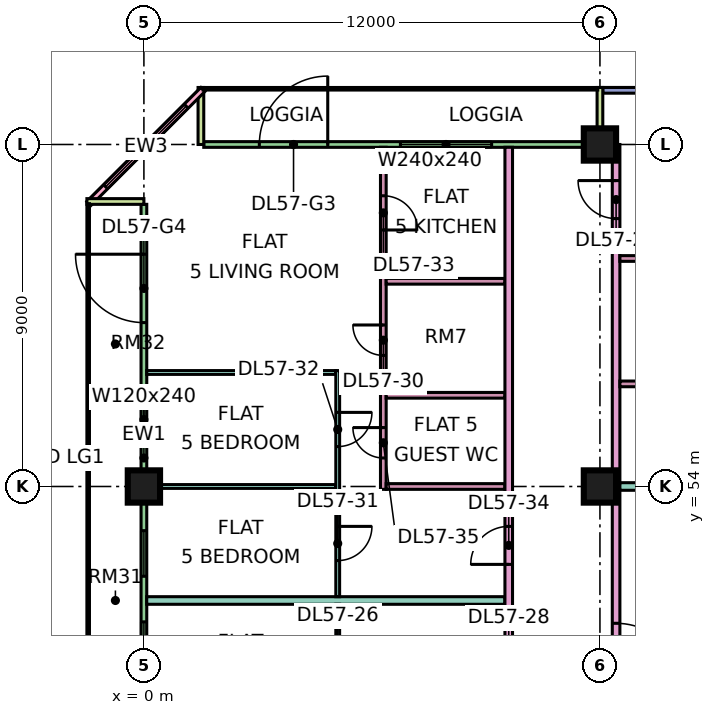
"""IFC4 building model, lengths in metres.
Left out: names, types, materials, properties, quantities, classifications, styles, units other than length and angle.
Written with IfcOpenShell. Run it as: python <this file> out.ifc"""

import sys

from ifc_helpers import new_model, si_unit, direction, frame, frame_2d, origin, origin_2d, place, context, subcontext, project, spatial, rectangle, extrude, element, fill, save


model = new_model("IFC4")
c1 = context("Model", 3, precision=1e-05, world=origin(), true_north=direction((0.0, 1.0)))
c2 = subcontext(c1, "Body", "Model", "MODEL_VIEW")
j1 = project(units=[si_unit("LENGTHUNIT", "METRE"), si_unit("PLANEANGLEUNIT", "RADIAN")], contexts=[c1])
p1 = place(None, origin())
s1 = spatial("IfcSite", under=j1, at=p1, CompositionType="ELEMENT")
p2 = place(p1, origin())
s2 = spatial("IfcBuilding", under=s1, at=p2, CompositionType="ELEMENT")
p3 = place(p2, frame((0.0, 0.0, 241.65)))
s3 = spatial("IfcBuildingStorey", under=s2, at=p3, CompositionType="ELEMENT", Elevation=241.65)
for number, where, z_axis, x_axis in (
    (1, (0.0, 54.0, 0.0), (0.0, 0.0, 1.0), (1.0, 0.0, 0.0)),
    (2, (12.0, 54.0, 0.0), (0.0, 0.0, 1.0), (1.0, 0.0, 0.0)),
    (3, (12.0, 63.0, 0.0), (0.0, 0.0, 1.0), (1.0, 0.0, 0.0)),
):
    element("IfcColumn", number, at=place(p3, frame(where, z_axis=z_axis, x_axis=x_axis)), inside=s3, PredefinedType="COLUMN", context=c2, shape_type="SweptSolid", body=[
        extrude(rectangle(XDim=0.85, YDim=0.85, at=origin_2d()), origin(), (0.0, 0.0, 1.0), 3.75),
    ])
p4 = place(p3, frame((22.5, 64.425, 0.0), z_axis=(0.0, 0.0, 1.0), x_axis=(-1.0, 0.0, 0.0)))
e4 = element("IfcWall", 4, at=p4, inside=s3, PredefinedType="SOLIDWALL", context=c2, shape_type="SweptSolid", body=[
    extrude(rectangle(XDim=10.425, YDim=0.15, at=frame_2d((5.212, 0.0))), origin(), (0.0, 0.0, 1.0), 3.35),
])
p5 = place(p4, frame((0.538, 0.0, 0.45)))
e5 = element("IfcOpeningElement", 5, at=p5, cuts=e4, PredefinedType="OPENING", context=c2, shape_type="SweptSolid", body=[
    extrude(rectangle(XDim=2.4, YDim=2.4, at=frame_2d((1.2, 1.2))), frame((0.0, 0.085, 0.0), z_axis=(0.0, -1.0, 0.0), x_axis=(1.0, 0.0, 0.0)), (0.0, 0.0, 1.0), 0.17),
])
p6 = place(p4, frame((5.275, 0.0, 0.45)))
e6 = element("IfcOpeningElement", 6, at=p6, cuts=e4, PredefinedType="OPENING", context=c2, shape_type="SweptSolid", body=[
    extrude(rectangle(XDim=3.0, YDim=2.4, at=frame_2d((1.5, 1.2))), frame((0.0, 0.085, 0.0), z_axis=(0.0, -1.0, 0.0), x_axis=(1.0, 0.0, 0.0)), (0.0, 0.0, 1.0), 0.17),
])
p7 = place(p3, frame((11.925, 63.0, 0.0), z_axis=(0.0, 0.0, 1.0), x_axis=(-1.0, 0.0, 0.0)))
e7 = element("IfcWall", 7, at=p7, inside=s3, PredefinedType="SOLIDWALL", context=c2, shape_type="SweptSolid", body=[
    extrude(rectangle(XDim=10.35, YDim=0.15, at=frame_2d((5.175, 0.0))), origin(), (0.0, 0.0, 1.0), 3.35),
])
p8 = place(p7, frame((2.775, 0.0, 0.45)))
e8 = element("IfcOpeningElement", 8, at=p8, cuts=e7, PredefinedType="OPENING", context=c2, shape_type="SweptSolid", body=[
    extrude(rectangle(XDim=2.4, YDim=2.4, at=frame_2d((1.2, 1.2))), frame((0.0, 0.085, 0.0), z_axis=(0.0, -1.0, 0.0), x_axis=(1.0, 0.0, 0.0)), (0.0, 0.0, 1.0), 0.17),
])
p9 = place(p7, frame((7.087, 0.0, 0.0)))
e9 = element("IfcOpeningElement", 9, at=p9, cuts=e7, PredefinedType="OPENING", context=c2, shape_type="SweptSolid", body=[
    extrude(rectangle(XDim=1.8, YDim=2.4, at=frame_2d((0.9, 1.2))), frame((0.0, 0.085, 0.0), z_axis=(0.0, -1.0, 0.0), x_axis=(1.0, 0.0, 0.0)), (0.0, 0.0, 1.0), 0.17),
])
for number, where, z_axis, x_axis in (
    (10, (12.0, 64.5, 0.0), (0.0, 0.0, 1.0), (0.0, -1.0, 0.0)),
    (11, (1.5, 64.5, 0.0), (0.0, 0.0, 1.0), (0.0, -1.0, 0.0)),
):
    element("IfcWall", number, at=place(p3, frame(where, z_axis=z_axis, x_axis=x_axis)), inside=s3, PredefinedType="SOLIDWALL", context=c2, shape_type="SweptSolid", body=[
        extrude(rectangle(XDim=1.5, YDim=0.15, at=frame_2d((0.75, 0.0))), origin(), (0.0, 0.0, 1.0), 3.35),
    ])
p10 = place(p3, frame((1.553, 64.447, 0.0), z_axis=(0.0, 0.0, 1.0), x_axis=(-0.707106781187, -0.707106781187, 0.0)))
e12 = element("IfcWall", 12, at=p10, inside=s3, PredefinedType="SOLIDWALL", context=c2, shape_type="SweptSolid", body=[
    extrude(rectangle(XDim=4.243, YDim=0.15, at=frame_2d((2.121, 0.0))), origin(), (0.0, 0.0, 1.0), 3.35),
])
p11 = place(p10, frame((0.621, 0.0, 0.45)))
e13 = element("IfcOpeningElement", 13, at=p11, cuts=e12, PredefinedType="OPENING", context=c2, shape_type="SweptSolid", body=[
    extrude(rectangle(XDim=3.0, YDim=2.4, at=frame_2d((1.5, 1.2))), frame((0.0, 0.085, 0.0), z_axis=(0.0, -1.0, 0.0), x_axis=(1.0, 0.0, 0.0)), (0.0, 0.0, 1.0), 0.17),
])
p12 = place(p3, frame((0.0, 61.425, 0.0), z_axis=(0.0, 0.0, 1.0), x_axis=(0.0, -1.0, 0.0)))
e14 = element("IfcWall", 14, at=p12, inside=s3, PredefinedType="SOLIDWALL", context=c2, shape_type="SweptSolid", body=[
    extrude(rectangle(XDim=13.35, YDim=0.15, at=frame_2d((6.675, 0.0))), origin(), (0.0, 0.0, 1.0), 3.35),
])
p13 = place(p12, frame((1.312, 0.0, 0.0)))
e15 = element("IfcOpeningElement", 15, at=p13, cuts=e14, PredefinedType="OPENING", context=c2, shape_type="SweptSolid", body=[
    extrude(rectangle(XDim=1.8, YDim=2.4, at=frame_2d((0.9, 1.2))), frame((0.0, 0.085, 0.0), z_axis=(0.0, -1.0, 0.0), x_axis=(1.0, 0.0, 0.0)), (0.0, 0.0, 1.0), 0.17),
])
p14 = place(p12, frame((5.062, 0.0, 0.45)))
e16 = element("IfcOpeningElement", 16, at=p14, cuts=e14, PredefinedType="OPENING", context=c2, shape_type="SweptSolid", body=[
    extrude(rectangle(XDim=1.2, YDim=2.4, at=frame_2d((0.6, 1.2))), frame((0.0, 0.085, 0.0), z_axis=(0.0, -1.0, 0.0), x_axis=(1.0, 0.0, 0.0)), (0.0, 0.0, 1.0), 0.17),
])
p15 = place(p12, frame((8.587, 0.0, 0.45)))
e17 = element("IfcOpeningElement", 17, at=p15, cuts=e14, PredefinedType="OPENING", context=c2, shape_type="SweptSolid", body=[
    extrude(rectangle(XDim=1.2, YDim=2.4, at=frame_2d((0.6, 1.2))), frame((0.0, 0.085, 0.0), z_axis=(0.0, -1.0, 0.0), x_axis=(1.0, 0.0, 0.0)), (0.0, 0.0, 1.0), 0.17),
])
p16 = place(p12, frame((10.988, 0.0, 0.45)))
e18 = element("IfcOpeningElement", 18, at=p16, cuts=e14, PredefinedType="OPENING", context=c2, shape_type="SweptSolid", body=[
    extrude(rectangle(XDim=1.8, YDim=2.4, at=frame_2d((0.9, 1.2))), frame((0.0, 0.085, 0.0), z_axis=(0.0, -1.0, 0.0), x_axis=(1.0, 0.0, 0.0)), (0.0, 0.0, 1.0), 0.17),
])
p17 = place(p3, frame((-1.5, 61.5, 0.0), z_axis=(0.0, 0.0, 1.0), x_axis=(1.0, 0.0, 0.0)))
e19 = element("IfcWall", 19, at=p17, inside=s3, PredefinedType="SOLIDWALL", context=c2, shape_type="SweptSolid", body=[
    extrude(rectangle(XDim=1.5, YDim=0.15, at=frame_2d((0.75, 0.0))), origin(), (0.0, 0.0, 1.0), 3.35),
])
p18 = place(p3, frame((0.074, 51.0, 0.0), z_axis=(0.0, 0.0, 1.0), x_axis=(1.0, 0.0, 0.0)))
e20 = element("IfcWall", 20, at=p18, inside=s3, PredefinedType="PARTITIONING", context=c2, shape_type="SweptSolid", body=[
    extrude(rectangle(XDim=9.426, YDim=0.2, at=frame_2d((4.713, 0.0))), origin(), (0.0, 0.0, 1.0), 3.35),
])
for number, where, z_axis, x_axis in (
    (21, (0.074, 54.0, 0.0), (0.0, 0.0, 1.0), (1.0, 0.0, 0.0)),
    (22, (0.074, 57.0, 0.0), (0.0, 0.0, 1.0), (1.0, 0.0, 0.0)),
):
    element("IfcWall", number, at=place(p3, frame(where, z_axis=z_axis, x_axis=x_axis)), inside=s3, PredefinedType="PARTITIONING", context=c2, shape_type="SweptSolid", body=[
        extrude(rectangle(XDim=4.976, YDim=0.1, at=frame_2d((2.488, 0.0))), origin(), (0.0, 0.0, 1.0), 3.35),
    ])
p19 = place(p3, frame((5.1, 44.95, 0.0), z_axis=(0.0, 0.0, 1.0), x_axis=(0.0, 1.0, 0.0)))
e23 = element("IfcWall", 23, at=p19, inside=s3, PredefinedType="PARTITIONING", context=c2, shape_type="SweptSolid", body=[
    extrude(rectangle(XDim=5.95, YDim=0.1, at=frame_2d((2.975, 0.0))), origin(), (0.0, 0.0, 1.0), 3.35),
])
p20 = place(p19, frame((1.1, 0.0, 0.0)))
e24 = element("IfcOpeningElement", 24, at=p20, cuts=e23, PredefinedType="OPENING", context=c2, shape_type="SweptSolid", body=[
    extrude(rectangle(XDim=0.9, YDim=2.1, at=frame_2d((0.45, 1.05))), frame((0.0, 0.06, 0.0), z_axis=(0.0, -1.0, 0.0), x_axis=(1.0, 0.0, 0.0)), (0.0, 0.0, 1.0), 0.12),
])
p21 = place(p19, frame((4.1, 0.0, 0.0)))
e25 = element("IfcOpeningElement", 25, at=p21, cuts=e23, PredefinedType="OPENING", context=c2, shape_type="SweptSolid", body=[
    extrude(rectangle(XDim=0.9, YDim=2.1, at=frame_2d((0.45, 1.05))), frame((0.0, 0.06, 0.0), z_axis=(0.0, -1.0, 0.0), x_axis=(1.0, 0.0, 0.0)), (0.0, 0.0, 1.0), 0.12),
])
p22 = place(p3, frame((5.1, 51.1, 0.0), z_axis=(0.0, 0.0, 1.0), x_axis=(0.0, 1.0, 0.0)))
e26 = element("IfcWall", 26, at=p22, inside=s3, PredefinedType="PARTITIONING", context=c2, shape_type="SweptSolid", body=[
    extrude(rectangle(XDim=5.95, YDim=0.1, at=frame_2d((2.975, 0.0))), origin(), (0.0, 0.0, 1.0), 3.35),
])
p23 = place(p22, frame((0.95, 0.0, 0.0)))
e27 = element("IfcOpeningElement", 27, at=p23, cuts=e26, PredefinedType="OPENING", context=c2, shape_type="SweptSolid", body=[
    extrude(rectangle(XDim=0.9, YDim=2.1, at=frame_2d((0.45, 1.05))), frame((0.0, 0.06, 0.0), z_axis=(0.0, -1.0, 0.0), x_axis=(1.0, 0.0, 0.0)), (0.0, 0.0, 1.0), 0.12),
])
p24 = place(p22, frame((3.95, 0.0, 0.0)))
e28 = element("IfcOpeningElement", 28, at=p24, cuts=e26, PredefinedType="OPENING", context=c2, shape_type="SweptSolid", body=[
    extrude(rectangle(XDim=0.9, YDim=2.1, at=frame_2d((0.45, 1.05))), frame((0.0, 0.06, 0.0), z_axis=(0.0, -1.0, 0.0), x_axis=(1.0, 0.0, 0.0)), (0.0, 0.0, 1.0), 0.12),
])
p25 = place(p3, frame((6.3, 53.925, 0.0), z_axis=(0.0, 0.0, 1.0), x_axis=(0.0, 1.0, 0.0)))
e29 = element("IfcWall", 29, at=p25, inside=s3, PredefinedType="PARTITIONING", context=c2, shape_type="SweptSolid", body=[
    extrude(rectangle(XDim=9.001, YDim=0.15, at=frame_2d((4.5, 0.0))), origin(), (0.0, 0.0, 1.0), 3.35),
])
p26 = place(p25, frame((3.525, 0.0, 0.0)))
e30 = element("IfcOpeningElement", 30, at=p26, cuts=e29, PredefinedType="OPENING", context=c2, shape_type="SweptSolid", body=[
    extrude(rectangle(XDim=0.8, YDim=2.1, at=frame_2d((0.4, 1.05))), frame((0.0, 0.085, 0.0), z_axis=(0.0, -1.0, 0.0), x_axis=(1.0, 0.0, 0.0)), (0.0, 0.0, 1.0), 0.17),
])
p27 = place(p25, frame((6.825, 0.0, 0.0)))
e31 = element("IfcOpeningElement", 31, at=p27, cuts=e29, PredefinedType="OPENING", context=c2, shape_type="SweptSolid", body=[
    extrude(rectangle(XDim=0.9, YDim=2.1, at=frame_2d((0.45, 1.05))), frame((0.0, 0.085, 0.0), z_axis=(0.0, -1.0, 0.0), x_axis=(1.0, 0.0, 0.0)), (0.0, 0.0, 1.0), 0.17),
])
p28 = place(p25, frame((0.825, 0.0, 0.0)))
e32 = element("IfcOpeningElement", 32, at=p28, cuts=e29, PredefinedType="OPENING", context=c2, shape_type="SweptSolid", body=[
    extrude(rectangle(XDim=0.8, YDim=2.1, at=frame_2d((0.4, 1.05))), frame((0.0, 0.085, 0.0), z_axis=(0.0, -1.0, 0.0), x_axis=(1.0, 0.0, 0.0)), (0.0, 0.0, 1.0), 0.17),
])
for number, where, z_axis, x_axis in (
    (33, (6.375, 54.0, 0.0), (0.0, 0.0, 1.0), (1.0, 0.0, 0.0)),
    (34, (6.375, 56.4, 0.0), (0.0, 0.0, 1.0), (1.0, 0.0, 0.0)),
    (35, (6.375, 59.4, 0.0), (0.0, 0.0, 1.0), (1.0, 0.0, 0.0)),
):
    element("IfcWall", number, at=place(p3, frame(where, z_axis=z_axis, x_axis=x_axis)), inside=s3, PredefinedType="PARTITIONING", context=c2, shape_type="SweptSolid", body=[
        extrude(rectangle(XDim=3.125, YDim=0.15, at=frame_2d((1.562, 0.0))), origin(), (0.0, 0.0, 1.0), 3.35),
    ])
p29 = place(p3, frame((9.6, 20.0, 0.0), z_axis=(0.0, 0.0, 1.0), x_axis=(0.0, 1.0, 0.0)))
e36 = element("IfcWall", 36, at=p29, inside=s3, PredefinedType="PARTITIONING", context=c2, shape_type="SweptSolid", body=[
    extrude(rectangle(XDim=42.926, YDim=0.2, at=frame_2d((21.463, 0.0))), origin(), (0.0, 0.0, 1.0), 3.35),
])
p30 = place(p29, frame((28.95, 0.0, 0.0)))
e37 = element("IfcOpeningElement", 37, at=p30, cuts=e36, PredefinedType="OPENING", context=c2, shape_type="SweptSolid", body=[
    extrude(rectangle(XDim=1.0, YDim=2.1, at=frame_2d((0.5, 1.05))), frame((0.0, 0.11, 0.0), z_axis=(0.0, -1.0, 0.0), x_axis=(1.0, 0.0, 0.0)), (0.0, 0.0, 1.0), 0.22),
])
p31 = place(p29, frame((31.95, 0.0, 0.0)))
e38 = element("IfcOpeningElement", 38, at=p31, cuts=e36, PredefinedType="OPENING", context=c2, shape_type="SweptSolid", body=[
    extrude(rectangle(XDim=1.0, YDim=2.1, at=frame_2d((0.5, 1.05))), frame((0.0, 0.11, 0.0), z_axis=(0.0, -1.0, 0.0), x_axis=(1.0, 0.0, 0.0)), (0.0, 0.0, 1.0), 0.22),
])
p32 = place(p29, frame((0.6, 0.0, 0.0)))
e39 = element("IfcOpeningElement", 39, at=p32, cuts=e36, PredefinedType="OPENING", context=c2, shape_type="SweptSolid", body=[
    extrude(rectangle(XDim=1.2, YDim=2.1, at=frame_2d((0.6, 1.05))), frame((0.0, 0.11, 0.0), z_axis=(0.0, -1.0, 0.0), x_axis=(1.0, 0.0, 0.0)), (0.0, 0.0, 1.0), 0.22),
])
p33 = place(p29, frame((11.25, 0.0, 0.0)))
e40 = element("IfcOpeningElement", 40, at=p33, cuts=e36, PredefinedType="OPENING", context=c2, shape_type="SweptSolid", body=[
    extrude(rectangle(XDim=1.0, YDim=2.1, at=frame_2d((0.5, 1.05))), frame((0.0, 0.11, 0.0), z_axis=(0.0, -1.0, 0.0), x_axis=(1.0, 0.0, 0.0)), (0.0, 0.0, 1.0), 0.22),
])
p34 = place(p3, frame((12.425, 20.0, 0.0), z_axis=(0.0, 0.0, 1.0), x_axis=(0.0, 1.0, 0.0)))
e41 = element("IfcWall", 41, at=p34, inside=s3, PredefinedType="PARTITIONING", context=c2, shape_type="SweptSolid", body=[
    extrude(rectangle(XDim=43.0, YDim=0.2, at=frame_2d((21.5, 0.0))), origin(), (0.0, 0.0, 1.0), 3.35),
])
p35 = place(p34, frame((5.95, 0.0, 0.0)))
e42 = element("IfcOpeningElement", 42, at=p35, cuts=e41, PredefinedType="OPENING", context=c2, shape_type="SweptSolid", body=[
    extrude(rectangle(XDim=1.0, YDim=2.1, at=frame_2d((0.5, 1.05))), frame((0.0, 0.11, 0.0), z_axis=(0.0, -1.0, 0.0), x_axis=(1.0, 0.0, 0.0)), (0.0, 0.0, 1.0), 0.22),
])
p36 = place(p34, frame((12.0, 0.0, 0.0)))
e43 = element("IfcOpeningElement", 43, at=p36, cuts=e41, PredefinedType="OPENING", context=c2, shape_type="SweptSolid", body=[
    extrude(rectangle(XDim=1.0, YDim=2.1, at=frame_2d((0.5, 1.05))), frame((0.0, 0.11, 0.0), z_axis=(0.0, -1.0, 0.0), x_axis=(1.0, 0.0, 0.0)), (0.0, 0.0, 1.0), 0.22),
])
p37 = place(p34, frame((16.9, 0.0, 0.0)))
e44 = element("IfcOpeningElement", 44, at=p37, cuts=e41, PredefinedType="OPENING", context=c2, shape_type="SweptSolid", body=[
    extrude(rectangle(XDim=1.0, YDim=2.1, at=frame_2d((0.5, 1.05))), frame((0.0, 0.11, 0.0), z_axis=(0.0, -1.0, 0.0), x_axis=(1.0, 0.0, 0.0)), (0.0, 0.0, 1.0), 0.22),
])
p38 = place(p34, frame((41.05, 0.0, 0.0)))
e45 = element("IfcOpeningElement", 45, at=p38, cuts=e41, PredefinedType="OPENING", context=c2, shape_type="SweptSolid", body=[
    extrude(rectangle(XDim=1.0, YDim=2.1, at=frame_2d((0.5, 1.05))), frame((0.0, 0.11, 0.0), z_axis=(0.0, -1.0, 0.0), x_axis=(1.0, 0.0, 0.0)), (0.0, 0.0, 1.0), 0.22),
])
p39 = place(p34, frame((1.15, 0.0, 0.0)))
e46 = element("IfcOpeningElement", 46, at=p39, cuts=e41, PredefinedType="OPENING", context=c2, shape_type="SweptSolid", body=[
    extrude(rectangle(XDim=1.8, YDim=2.1, at=frame_2d((0.9, 1.05))), frame((0.0, 0.11, 0.0), z_axis=(0.0, -1.0, 0.0), x_axis=(1.0, 0.0, 0.0)), (0.0, 0.0, 1.0), 0.22),
])
p40 = place(p34, frame((28.6, 0.0, 0.0)))
e47 = element("IfcOpeningElement", 47, at=p40, cuts=e41, PredefinedType="OPENING", context=c2, shape_type="SweptSolid", body=[
    extrude(rectangle(XDim=1.8, YDim=2.1, at=frame_2d((0.9, 1.05))), frame((0.0, 0.11, 0.0), z_axis=(0.0, -1.0, 0.0), x_axis=(1.0, 0.0, 0.0)), (0.0, 0.0, 1.0), 0.22),
])
p41 = place(p3, frame((12.525, 54.0, 0.0), z_axis=(0.0, 0.0, 1.0), x_axis=(1.0, 0.0, 0.0)))
e48 = element("IfcWall", 48, at=p41, inside=s3, PredefinedType="PARTITIONING", context=c2, shape_type="SweptSolid", body=[
    extrude(rectangle(XDim=11.401, YDim=0.2, at=frame_2d((5.701, 0.0))), origin(), (0.0, 0.0, 1.0), 3.35),
])
for number, where, z_axis, x_axis in (
    (49, (12.525, 56.7, 0.0), (0.0, 0.0, 1.0), (1.0, 0.0, 0.0)),
    (50, (12.525, 60.0, 0.0), (0.0, 0.0, 1.0), (1.0, 0.0, 0.0)),
):
    element("IfcWall", number, at=place(p3, frame(where, z_axis=z_axis, x_axis=x_axis)), inside=s3, PredefinedType="PARTITIONING", context=c2, shape_type="SweptSolid", body=[
        extrude(rectangle(XDim=5.225, YDim=0.15, at=frame_2d((2.613, 0.0))), origin(), (0.0, 0.0, 1.0), 3.35),
    ])
p42 = place(p8, origin())
e51 = element("IfcWindow", 51, at=p42, inside=s3, PartitioningType="SINGLE_PANEL", PredefinedType="WINDOW", context=c2, shape_type="SweptSolid", body=[
    extrude(rectangle(XDim=2.4, YDim=2.4, at=frame_2d((1.2, 1.2))), frame((0.0, 0.03, 0.0), z_axis=(0.0, -1.0, 0.0), x_axis=(1.0, 0.0, 0.0)), (0.0, 0.0, 1.0), 0.06),
])
fill(e8, e51)
p43 = place(p9, frame((1.8, 0.0, 0.0), z_axis=(0.0, 0.0, 1.0), x_axis=(-1.0, 0.0, 0.0)))
e52 = element("IfcDoor", 52, at=p43, inside=s3, OperationType="DOUBLE_DOOR_SINGLE_SWING", PredefinedType="DOOR", context=c2, shape_type="SweptSolid", body=[
    extrude(rectangle(XDim=1.8, YDim=2.4, at=frame_2d((0.9, 1.2))), frame((0.0, 0.025, 0.0), z_axis=(0.0, -1.0, 0.0), x_axis=(1.0, 0.0, 0.0)), (0.0, 0.0, 1.0), 0.05),
])
fill(e9, e52)
p44 = place(p11, origin())
e53 = element("IfcWindow", 53, at=p44, inside=s3, PartitioningType="SINGLE_PANEL", PredefinedType="WINDOW", context=c2, shape_type="SweptSolid", body=[
    extrude(rectangle(XDim=3.0, YDim=2.4, at=frame_2d((1.5, 1.2))), frame((0.0, 0.03, 0.0), z_axis=(0.0, -1.0, 0.0), x_axis=(1.0, 0.0, 0.0)), (0.0, 0.0, 1.0), 0.06),
])
fill(e13, e53)
p45 = place(p13, frame((1.8, 0.0, 0.0), z_axis=(0.0, 0.0, 1.0), x_axis=(-1.0, 0.0, 0.0)))
e54 = element("IfcDoor", 54, at=p45, inside=s3, OperationType="DOUBLE_DOOR_SINGLE_SWING", PredefinedType="DOOR", context=c2, shape_type="SweptSolid", body=[
    extrude(rectangle(XDim=1.8, YDim=2.4, at=frame_2d((0.9, 1.2))), frame((0.0, 0.025, 0.0), z_axis=(0.0, -1.0, 0.0), x_axis=(1.0, 0.0, 0.0)), (0.0, 0.0, 1.0), 0.05),
])
fill(e15, e54)
p46 = place(p14, origin())
e55 = element("IfcWindow", 55, at=p46, inside=s3, PartitioningType="SINGLE_PANEL", PredefinedType="WINDOW", context=c2, shape_type="SweptSolid", body=[
    extrude(rectangle(XDim=1.2, YDim=2.4, at=frame_2d((0.6, 1.2))), frame((0.0, 0.03, 0.0), z_axis=(0.0, -1.0, 0.0), x_axis=(1.0, 0.0, 0.0)), (0.0, 0.0, 1.0), 0.06),
])
fill(e16, e55)
p47 = place(p15, origin())
e56 = element("IfcWindow", 56, at=p47, inside=s3, PartitioningType="SINGLE_PANEL", PredefinedType="WINDOW", context=c2, shape_type="SweptSolid", body=[
    extrude(rectangle(XDim=1.2, YDim=2.4, at=frame_2d((0.6, 1.2))), frame((0.0, 0.03, 0.0), z_axis=(0.0, -1.0, 0.0), x_axis=(1.0, 0.0, 0.0)), (0.0, 0.0, 1.0), 0.06),
])
fill(e17, e56)
p48 = place(p16, origin())
e57 = element("IfcWindow", 57, at=p48, inside=s3, PartitioningType="SINGLE_PANEL", PredefinedType="WINDOW", context=c2, shape_type="SweptSolid", body=[
    extrude(rectangle(XDim=1.8, YDim=2.4, at=frame_2d((0.9, 1.2))), frame((0.0, 0.03, 0.0), z_axis=(0.0, -1.0, 0.0), x_axis=(1.0, 0.0, 0.0)), (0.0, 0.0, 1.0), 0.06),
])
fill(e18, e57)
p49 = place(p38, frame((1.0, 0.0, 0.0), z_axis=(0.0, 0.0, 1.0), x_axis=(-1.0, 0.0, 0.0)))
e58 = element("IfcDoor", 58, at=p49, inside=s3, OperationType="SINGLE_SWING_RIGHT", PredefinedType="DOOR", context=c2, shape_type="SweptSolid", body=[
    extrude(rectangle(XDim=1.0, YDim=2.1, at=frame_2d((0.5, 1.05))), frame((0.0, 0.025, 0.0), z_axis=(0.0, -1.0, 0.0), x_axis=(1.0, 0.0, 0.0)), (0.0, 0.0, 1.0), 0.05),
])
fill(e45, e58)
p50 = place(p26, frame((0.8, 0.0, 0.0), z_axis=(0.0, 0.0, 1.0), x_axis=(-1.0, 0.0, 0.0)))
e59 = element("IfcDoor", 59, at=p50, inside=s3, OperationType="SINGLE_SWING_RIGHT", PredefinedType="DOOR", context=c2, shape_type="SweptSolid", body=[
    extrude(rectangle(XDim=0.8, YDim=2.1, at=frame_2d((0.4, 1.05))), frame((0.0, 0.025, 0.0), z_axis=(0.0, -1.0, 0.0), x_axis=(1.0, 0.0, 0.0)), (0.0, 0.0, 1.0), 0.05),
])
fill(e30, e59)
p51 = place(p23, origin())
e60 = element("IfcDoor", 60, at=p51, inside=s3, OperationType="SINGLE_SWING_RIGHT", PredefinedType="DOOR", context=c2, shape_type="SweptSolid", body=[
    extrude(rectangle(XDim=0.9, YDim=2.1, at=frame_2d((0.45, 1.05))), frame((0.0, 0.025, 0.0), z_axis=(0.0, -1.0, 0.0), x_axis=(1.0, 0.0, 0.0)), (0.0, 0.0, 1.0), 0.05),
])
fill(e27, e60)
p52 = place(p24, origin())
e61 = element("IfcDoor", 61, at=p52, inside=s3, OperationType="SINGLE_SWING_RIGHT", PredefinedType="DOOR", context=c2, shape_type="SweptSolid", body=[
    extrude(rectangle(XDim=0.9, YDim=2.1, at=frame_2d((0.45, 1.05))), frame((0.0, 0.025, 0.0), z_axis=(0.0, -1.0, 0.0), x_axis=(1.0, 0.0, 0.0)), (0.0, 0.0, 1.0), 0.05),
])
fill(e28, e61)
p53 = place(p27, frame((0.9, 0.0, 0.0), z_axis=(0.0, 0.0, 1.0), x_axis=(-1.0, 0.0, 0.0)))
e62 = element("IfcDoor", 62, at=p53, inside=s3, OperationType="SINGLE_SWING_LEFT", PredefinedType="DOOR", context=c2, shape_type="SweptSolid", body=[
    extrude(rectangle(XDim=0.9, YDim=2.1, at=frame_2d((0.45, 1.05))), frame((0.0, 0.025, 0.0), z_axis=(0.0, -1.0, 0.0), x_axis=(1.0, 0.0, 0.0)), (0.0, 0.0, 1.0), 0.05),
])
fill(e31, e62)
p54 = place(p31, origin())
e63 = element("IfcDoor", 63, at=p54, inside=s3, OperationType="SINGLE_SWING_LEFT", PredefinedType="DOOR", context=c2, shape_type="SweptSolid", body=[
    extrude(rectangle(XDim=1.0, YDim=2.1, at=frame_2d((0.5, 1.05))), frame((0.0, 0.025, 0.0), z_axis=(0.0, -1.0, 0.0), x_axis=(1.0, 0.0, 0.0)), (0.0, 0.0, 1.0), 0.05),
])
fill(e38, e63)
p55 = place(p28, frame((0.8, 0.0, 0.0), z_axis=(0.0, 0.0, 1.0), x_axis=(-1.0, 0.0, 0.0)))
e64 = element("IfcDoor", 64, at=p55, inside=s3, OperationType="SINGLE_SWING_RIGHT", PredefinedType="DOOR", context=c2, shape_type="SweptSolid", body=[
    extrude(rectangle(XDim=0.8, YDim=2.1, at=frame_2d((0.4, 1.05))), frame((0.0, 0.025, 0.0), z_axis=(0.0, -1.0, 0.0), x_axis=(1.0, 0.0, 0.0)), (0.0, 0.0, 1.0), 0.05),
])
fill(e32, e64)
p56 = place(p40, frame((1.8, 0.0, 0.0), z_axis=(0.0, 0.0, 1.0), x_axis=(-1.0, 0.0, 0.0)))
e65 = element("IfcDoor", 65, at=p56, inside=s3, OperationType="DOUBLE_DOOR_SINGLE_SWING", PredefinedType="DOOR", context=c2, shape_type="SweptSolid", body=[
    extrude(rectangle(XDim=1.8, YDim=2.1, at=frame_2d((0.9, 1.05))), frame((0.0, 0.025, 0.0), z_axis=(0.0, -1.0, 0.0), x_axis=(1.0, 0.0, 0.0)), (0.0, 0.0, 1.0), 0.05),
])
fill(e47, e65)
save(model, sys.argv[1])
